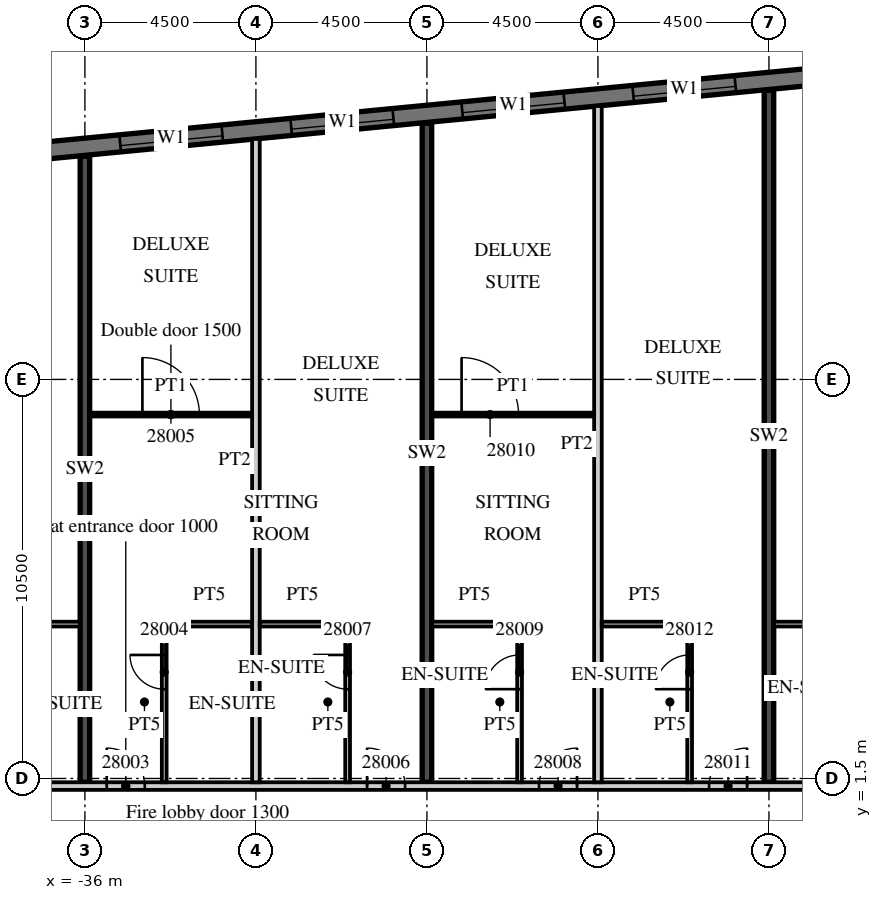
"""IFC4 building model, lengths in metres.
Left out: names, types, materials, properties, quantities, classifications, styles, units other than length and angle.
Written with IfcOpenShell. Run it as: python <this file> out.ifc"""

import sys

from ifc_helpers import new_model, si_unit, direction, frame, frame_2d, origin, place, context, subcontext, project, spatial, rectangle, extrude, element, fill, save


model = new_model("IFC4")
c1 = context("Model", 3, precision=1e-05, world=origin(), true_north=direction((0.0, 1.0)))
c2 = subcontext(c1, "Body", "Model", "MODEL_VIEW")
j1 = project(units=[si_unit("LENGTHUNIT", "METRE"), si_unit("PLANEANGLEUNIT", "RADIAN")], contexts=[c1])
p1 = place(None, origin())
s1 = spatial("IfcSite", under=j1, at=p1, CompositionType="ELEMENT")
p2 = place(p1, origin())
s2 = spatial("IfcBuilding", under=s1, at=p2, CompositionType="ELEMENT")
p3 = place(p2, frame((0.0, 0.0, 127.3)))
s3 = spatial("IfcBuildingStorey", under=s2, at=p3, CompositionType="ELEMENT", Elevation=127.3)
p4 = place(p3, frame((-36.0, 1.4, 0.0), z_axis=(0.0, 0.0, 1.0), x_axis=(0.0, 1.0, 0.0)))
e1 = element("IfcWall", 1, at=p4, inside=s3, PredefinedType="SHEAR", context=c2, shape_type="SweptSolid", body=[
    extrude(rectangle(XDim=16.474, YDim=0.25, at=frame_2d((8.237, 0.0))), origin(), (0.0, 0.0, 1.0), 3.3),
])
p5 = place(p3, frame((-27.0, 1.4, 0.0), z_axis=(0.0, 0.0, 1.0), x_axis=(0.0, 1.0, 0.0)))
e2 = element("IfcWall", 2, at=p5, inside=s3, PredefinedType="SHEAR", context=c2, shape_type="SweptSolid", body=[
    extrude(rectangle(XDim=17.34, YDim=0.25, at=frame_2d((8.67, 0.0))), origin(), (0.0, 0.0, 1.0), 3.3),
])
p6 = place(p3, frame((-18.0, 1.4, 0.0), z_axis=(0.0, 0.0, 1.0), x_axis=(0.0, 1.0, 0.0)))
e3 = element("IfcWall", 3, at=p6, inside=s3, PredefinedType="SHEAR", context=c2, shape_type="SweptSolid", body=[
    extrude(rectangle(XDim=18.207, YDim=0.25, at=frame_2d((9.104, 0.0))), origin(), (0.0, 0.0, 1.0), 3.3),
])
p7 = place(p3, frame((13.521, 22.89, 0.0), z_axis=(0.0, 0.0, 1.0), x_axis=(-0.995396445054, -0.095843190545, 0.0)))
e4 = element("IfcWall", 4, at=p7, inside=s3, PredefinedType="SOLIDWALL", context=c2, shape_type="SweptSolid", body=[
    extrude(rectangle(XDim=51.114, YDim=0.45, at=frame_2d((25.557, 0.0))), origin(), (0.0, 0.0, 1.0), 3.02),
])
p8 = place(p7, frame((0.91, 0.0, 0.45)))
e5 = element("IfcOpeningElement", 5, at=p8, cuts=e4, PredefinedType="OPENING", context=c2, shape_type="SweptSolid", body=[
    extrude(rectangle(XDim=2.7, YDim=2.25, at=frame_2d((1.35, 1.125))), frame((0.0, 0.235, 0.0), z_axis=(0.0, -1.0, 0.0), x_axis=(1.0, 0.0, 0.0)), (0.0, 0.0, 1.0), 0.47),
])
p9 = place(p7, frame((5.431, 0.0, 0.45)))
e6 = element("IfcOpeningElement", 6, at=p9, cuts=e4, PredefinedType="OPENING", context=c2, shape_type="SweptSolid", body=[
    extrude(rectangle(XDim=2.7, YDim=2.25, at=frame_2d((1.35, 1.125))), frame((0.0, 0.235, 0.0), z_axis=(0.0, -1.0, 0.0), x_axis=(1.0, 0.0, 0.0)), (0.0, 0.0, 1.0), 0.47),
])
p10 = place(p7, frame((9.952, 0.0, 0.45)))
e7 = element("IfcOpeningElement", 7, at=p10, cuts=e4, PredefinedType="OPENING", context=c2, shape_type="SweptSolid", body=[
    extrude(rectangle(XDim=2.7, YDim=2.25, at=frame_2d((1.35, 1.125))), frame((0.0, 0.235, 0.0), z_axis=(0.0, -1.0, 0.0), x_axis=(1.0, 0.0, 0.0)), (0.0, 0.0, 1.0), 0.47),
])
p11 = place(p7, frame((14.473, 0.0, 0.45)))
e8 = element("IfcOpeningElement", 8, at=p11, cuts=e4, PredefinedType="OPENING", context=c2, shape_type="SweptSolid", body=[
    extrude(rectangle(XDim=2.7, YDim=2.25, at=frame_2d((1.35, 1.125))), frame((0.0, 0.235, 0.0), z_axis=(0.0, -1.0, 0.0), x_axis=(1.0, 0.0, 0.0)), (0.0, 0.0, 1.0), 0.47),
])
p12 = place(p7, frame((18.994, 0.0, 0.45)))
e9 = element("IfcOpeningElement", 9, at=p12, cuts=e4, PredefinedType="OPENING", context=c2, shape_type="SweptSolid", body=[
    extrude(rectangle(XDim=2.7, YDim=2.25, at=frame_2d((1.35, 1.125))), frame((0.0, 0.235, 0.0), z_axis=(0.0, -1.0, 0.0), x_axis=(1.0, 0.0, 0.0)), (0.0, 0.0, 1.0), 0.47),
])
p13 = place(p7, frame((23.514, 0.0, 0.45)))
e10 = element("IfcOpeningElement", 10, at=p13, cuts=e4, PredefinedType="OPENING", context=c2, shape_type="SweptSolid", body=[
    extrude(rectangle(XDim=2.7, YDim=2.25, at=frame_2d((1.35, 1.125))), frame((0.0, 0.235, 0.0), z_axis=(0.0, -1.0, 0.0), x_axis=(1.0, 0.0, 0.0)), (0.0, 0.0, 1.0), 0.47),
])
p14 = place(p7, frame((28.035, 0.0, 0.45)))
e11 = element("IfcOpeningElement", 11, at=p14, cuts=e4, PredefinedType="OPENING", context=c2, shape_type="SweptSolid", body=[
    extrude(rectangle(XDim=2.7, YDim=2.25, at=frame_2d((1.35, 1.125))), frame((0.0, 0.235, 0.0), z_axis=(0.0, -1.0, 0.0), x_axis=(1.0, 0.0, 0.0)), (0.0, 0.0, 1.0), 0.47),
])
p15 = place(p7, frame((32.556, 0.0, 0.45)))
e12 = element("IfcOpeningElement", 12, at=p15, cuts=e4, PredefinedType="OPENING", context=c2, shape_type="SweptSolid", body=[
    extrude(rectangle(XDim=2.7, YDim=2.25, at=frame_2d((1.35, 1.125))), frame((0.0, 0.235, 0.0), z_axis=(0.0, -1.0, 0.0), x_axis=(1.0, 0.0, 0.0)), (0.0, 0.0, 1.0), 0.47),
])
p16 = place(p7, frame((37.077, 0.0, 0.45)))
e13 = element("IfcOpeningElement", 13, at=p16, cuts=e4, PredefinedType="OPENING", context=c2, shape_type="SweptSolid", body=[
    extrude(rectangle(XDim=2.7, YDim=2.25, at=frame_2d((1.35, 1.125))), frame((0.0, 0.235, 0.0), z_axis=(0.0, -1.0, 0.0), x_axis=(1.0, 0.0, 0.0)), (0.0, 0.0, 1.0), 0.47),
])
p17 = place(p7, frame((41.598, 0.0, 0.45)))
e14 = element("IfcOpeningElement", 14, at=p17, cuts=e4, PredefinedType="OPENING", context=c2, shape_type="SweptSolid", body=[
    extrude(rectangle(XDim=2.7, YDim=2.25, at=frame_2d((1.35, 1.125))), frame((0.0, 0.235, 0.0), z_axis=(0.0, -1.0, 0.0), x_axis=(1.0, 0.0, 0.0)), (0.0, 0.0, 1.0), 0.47),
])
p18 = place(p7, frame((46.118, 0.0, 0.45)))
e15 = element("IfcOpeningElement", 15, at=p18, cuts=e4, PredefinedType="OPENING", context=c2, shape_type="SweptSolid", body=[
    extrude(rectangle(XDim=2.7, YDim=2.25, at=frame_2d((1.35, 1.125))), frame((0.0, 0.235, 0.0), z_axis=(0.0, -1.0, 0.0), x_axis=(1.0, 0.0, 0.0)), (0.0, 0.0, 1.0), 0.47),
])
p19 = place(p3, frame((-39.316, 1.3, 0.0), z_axis=(0.0, 0.0, 1.0), x_axis=(1.0, 0.0, 0.0)))
e16 = element("IfcWall", 16, at=p19, inside=s3, PredefinedType="PARTITIONING", context=c2, shape_type="SweptSolid", body=[
    extrude(rectangle(XDim=52.816, YDim=0.2, at=frame_2d((26.408, 0.0))), origin(), (0.0, 0.0, 1.0), 3.02),
])
p20 = place(p19, frame((0.15, 0.0, 0.0)))
e17 = element("IfcOpeningElement", 17, at=p20, cuts=e16, PredefinedType="OPENING", context=c2, shape_type="SweptSolid", body=[
    extrude(rectangle(XDim=0.9, YDim=2.1, at=frame_2d((0.45, 1.05))), frame((0.0, 0.11, 0.0), z_axis=(0.0, -1.0, 0.0), x_axis=(1.0, 0.0, 0.0)), (0.0, 0.0, 1.0), 0.22),
])
p21 = place(p19, frame((3.891, 0.0, 0.0)))
e18 = element("IfcOpeningElement", 18, at=p21, cuts=e16, PredefinedType="OPENING", context=c2, shape_type="SweptSolid", body=[
    extrude(rectangle(XDim=1.0, YDim=2.1, at=frame_2d((0.5, 1.05))), frame((0.0, 0.11, 0.0), z_axis=(0.0, -1.0, 0.0), x_axis=(1.0, 0.0, 0.0)), (0.0, 0.0, 1.0), 0.22),
])
p22 = place(p19, frame((10.741, 0.0, 0.0)))
e19 = element("IfcOpeningElement", 19, at=p22, cuts=e16, PredefinedType="OPENING", context=c2, shape_type="SweptSolid", body=[
    extrude(rectangle(XDim=1.0, YDim=2.1, at=frame_2d((0.5, 1.05))), frame((0.0, 0.11, 0.0), z_axis=(0.0, -1.0, 0.0), x_axis=(1.0, 0.0, 0.0)), (0.0, 0.0, 1.0), 0.22),
])
p23 = place(p19, frame((15.266, 0.0, 0.0)))
e20 = element("IfcOpeningElement", 20, at=p23, cuts=e16, PredefinedType="OPENING", context=c2, shape_type="SweptSolid", body=[
    extrude(rectangle(XDim=1.0, YDim=2.1, at=frame_2d((0.5, 1.05))), frame((0.0, 0.11, 0.0), z_axis=(0.0, -1.0, 0.0), x_axis=(1.0, 0.0, 0.0)), (0.0, 0.0, 1.0), 0.22),
])
p24 = place(p19, frame((19.741, 0.0, 0.0)))
e21 = element("IfcOpeningElement", 21, at=p24, cuts=e16, PredefinedType="OPENING", context=c2, shape_type="SweptSolid", body=[
    extrude(rectangle(XDim=1.0, YDim=2.1, at=frame_2d((0.5, 1.05))), frame((0.0, 0.11, 0.0), z_axis=(0.0, -1.0, 0.0), x_axis=(1.0, 0.0, 0.0)), (0.0, 0.0, 1.0), 0.22),
])
p25 = place(p19, frame((26.678, 0.0, 0.0)))
e22 = element("IfcOpeningElement", 22, at=p25, cuts=e16, PredefinedType="OPENING", context=c2, shape_type="SweptSolid", body=[
    extrude(rectangle(XDim=1.2, YDim=2.1, at=frame_2d((0.6, 1.05))), frame((0.0, 0.11, 0.0), z_axis=(0.0, -1.0, 0.0), x_axis=(1.0, 0.0, 0.0)), (0.0, 0.0, 1.0), 0.22),
])
p26 = place(p19, frame((35.678, 0.0, 0.0)))
e23 = element("IfcOpeningElement", 23, at=p26, cuts=e16, PredefinedType="OPENING", context=c2, shape_type="SweptSolid", body=[
    extrude(rectangle(XDim=1.2, YDim=2.1, at=frame_2d((0.6, 1.05))), frame((0.0, 0.11, 0.0), z_axis=(0.0, -1.0, 0.0), x_axis=(1.0, 0.0, 0.0)), (0.0, 0.0, 1.0), 0.22),
])
p27 = place(p19, frame((41.754, 0.0, 0.0)))
e24 = element("IfcOpeningElement", 24, at=p27, cuts=e16, PredefinedType="OPENING", context=c2, shape_type="SweptSolid", body=[
    extrude(rectangle(XDim=1.2, YDim=2.1, at=frame_2d((0.6, 1.05))), frame((0.0, 0.11, 0.0), z_axis=(0.0, -1.0, 0.0), x_axis=(1.0, 0.0, 0.0)), (0.0, 0.0, 1.0), 0.22),
])
p28 = place(p19, frame((51.241, 0.0, 0.0)))
e25 = element("IfcOpeningElement", 25, at=p28, cuts=e16, PredefinedType="OPENING", context=c2, shape_type="SweptSolid", body=[
    extrude(rectangle(XDim=1.0, YDim=2.1, at=frame_2d((0.5, 1.05))), frame((0.0, 0.11, 0.0), z_axis=(0.0, -1.0, 0.0), x_axis=(1.0, 0.0, 0.0)), (0.0, 0.0, 1.0), 0.22),
])
p29 = place(p3, frame((-38.457, 5.562, 0.0), z_axis=(0.0, 0.0, 1.0), x_axis=(1.0, 0.0, 0.0)))
e26 = element("IfcWall", 26, at=p29, inside=s3, PredefinedType="PARTITIONING", context=c2, shape_type="SweptSolid", body=[
    extrude(rectangle(XDim=2.332, YDim=0.125, at=frame_2d((1.166, 0.0))), origin(), (0.0, 0.0, 1.0), 3.02),
])
p30 = place(p3, frame((-31.5, 1.4, 0.0), z_axis=(0.0, 0.0, 1.0), x_axis=(0.0, 1.0, 0.0)))
e27 = element("IfcWall", 27, at=p30, inside=s3, PredefinedType="PARTITIONING", context=c2, shape_type="SweptSolid", body=[
    extrude(rectangle(XDim=16.929, YDim=0.2, at=frame_2d((8.465, 0.0))), origin(), (0.0, 0.0, 1.0), 3.02),
])
p31 = place(p3, frame((-33.913, 1.4, 0.0), z_axis=(0.0, 0.0, 1.0), x_axis=(0.0, 1.0, 0.0)))
e28 = element("IfcWall", 28, at=p31, inside=s3, PredefinedType="PARTITIONING", context=c2, shape_type="SweptSolid", body=[
    extrude(rectangle(XDim=4.225, YDim=0.125, at=frame_2d((2.113, 0.0))), origin(), (0.0, 0.0, 1.0), 3.02),
])
p32 = place(p31, frame((2.45, 0.0, 0.0)))
e29 = element("IfcOpeningElement", 29, at=p32, cuts=e28, PredefinedType="OPENING", context=c2, shape_type="SweptSolid", body=[
    extrude(rectangle(XDim=0.9, YDim=2.1, at=frame_2d((0.45, 1.05))), frame((0.0, 0.073, 0.0), z_axis=(0.0, -1.0, 0.0), x_axis=(1.0, 0.0, 0.0)), (0.0, 0.0, 1.0), 0.145),
])
p33 = place(p3, frame((-33.85, 5.562, 0.0), z_axis=(0.0, 0.0, 1.0), x_axis=(1.0, 0.0, 0.0)))
e30 = element("IfcWall", 30, at=p33, inside=s3, PredefinedType="PARTITIONING", context=c2, shape_type="SweptSolid", body=[
    extrude(rectangle(XDim=2.25, YDim=0.125, at=frame_2d((1.125, 0.0))), origin(), (0.0, 0.0, 1.0), 3.02),
])
p34 = place(p3, frame((-35.875, 11.075, 0.0), z_axis=(0.0, 0.0, 1.0), x_axis=(1.0, 0.0, 0.0)))
e31 = element("IfcWall", 31, at=p34, inside=s3, PredefinedType="PARTITIONING", context=c2, shape_type="SweptSolid", body=[
    extrude(rectangle(XDim=4.275, YDim=0.1, at=frame_2d((2.137, 0.0))), origin(), (0.0, 0.0, 1.0), 3.02),
])
p35 = place(p34, frame((1.388, 0.0, 0.0)))
e32 = element("IfcOpeningElement", 32, at=p35, cuts=e31, PredefinedType="OPENING", context=c2, shape_type="SweptSolid", body=[
    extrude(rectangle(XDim=1.5, YDim=2.1, at=frame_2d((0.75, 1.05))), frame((0.0, 0.06, 0.0), z_axis=(0.0, -1.0, 0.0), x_axis=(1.0, 0.0, 0.0)), (0.0, 0.0, 1.0), 0.12),
])
p36 = place(p3, frame((-29.087, 1.4, 0.0), z_axis=(0.0, 0.0, 1.0), x_axis=(0.0, 1.0, 0.0)))
e33 = element("IfcWall", 33, at=p36, inside=s3, PredefinedType="PARTITIONING", context=c2, shape_type="SweptSolid", body=[
    extrude(rectangle(XDim=4.225, YDim=0.125, at=frame_2d((2.113, 0.0))), origin(), (0.0, 0.0, 1.0), 3.02),
])
p37 = place(p36, frame((2.45, 0.0, 0.0)))
e34 = element("IfcOpeningElement", 34, at=p37, cuts=e33, PredefinedType="OPENING", context=c2, shape_type="SweptSolid", body=[
    extrude(rectangle(XDim=0.9, YDim=2.1, at=frame_2d((0.45, 1.05))), frame((0.0, 0.073, 0.0), z_axis=(0.0, -1.0, 0.0), x_axis=(1.0, 0.0, 0.0)), (0.0, 0.0, 1.0), 0.145),
])
p38 = place(p3, frame((-31.4, 5.562, 0.0), z_axis=(0.0, 0.0, 1.0), x_axis=(1.0, 0.0, 0.0)))
e35 = element("IfcWall", 35, at=p38, inside=s3, PredefinedType="PARTITIONING", context=c2, shape_type="SweptSolid", body=[
    extrude(rectangle(XDim=2.25, YDim=0.125, at=frame_2d((1.125, 0.0))), origin(), (0.0, 0.0, 1.0), 3.02),
])
p39 = place(p3, frame((-22.5, 1.4, 0.0), z_axis=(0.0, 0.0, 1.0), x_axis=(0.0, 1.0, 0.0)))
e36 = element("IfcWall", 36, at=p39, inside=s3, PredefinedType="PARTITIONING", context=c2, shape_type="SweptSolid", body=[
    extrude(rectangle(XDim=17.796, YDim=0.2, at=frame_2d((8.898, 0.0))), origin(), (0.0, 0.0, 1.0), 3.02),
])
p40 = place(p3, frame((-24.562, 1.4, 0.0), z_axis=(0.0, 0.0, 1.0), x_axis=(0.0, 1.0, 0.0)))
e37 = element("IfcWall", 37, at=p40, inside=s3, PredefinedType="PARTITIONING", context=c2, shape_type="SweptSolid", body=[
    extrude(rectangle(XDim=4.225, YDim=0.125, at=frame_2d((2.113, 0.0))), origin(), (0.0, 0.0, 1.0), 3.02),
])
p41 = place(p40, frame((2.45, 0.0, 0.0)))
e38 = element("IfcOpeningElement", 38, at=p41, cuts=e37, PredefinedType="OPENING", context=c2, shape_type="SweptSolid", body=[
    extrude(rectangle(XDim=0.9, YDim=2.1, at=frame_2d((0.45, 1.05))), frame((0.0, 0.073, 0.0), z_axis=(0.0, -1.0, 0.0), x_axis=(1.0, 0.0, 0.0)), (0.0, 0.0, 1.0), 0.145),
])
p42 = place(p3, frame((-26.875, 5.562, 0.0), z_axis=(0.0, 0.0, 1.0), x_axis=(1.0, 0.0, 0.0)))
e39 = element("IfcWall", 39, at=p42, inside=s3, PredefinedType="PARTITIONING", context=c2, shape_type="SweptSolid", body=[
    extrude(rectangle(XDim=2.25, YDim=0.125, at=frame_2d((1.125, 0.0))), origin(), (0.0, 0.0, 1.0), 3.02),
])
p43 = place(p3, frame((-26.875, 11.075, 0.0), z_axis=(0.0, 0.0, 1.0), x_axis=(1.0, 0.0, 0.0)))
e40 = element("IfcWall", 40, at=p43, inside=s3, PredefinedType="PARTITIONING", context=c2, shape_type="SweptSolid", body=[
    extrude(rectangle(XDim=4.275, YDim=0.1, at=frame_2d((2.137, 0.0))), origin(), (0.0, 0.0, 1.0), 3.02),
])
p44 = place(p43, frame((0.787, 0.0, 0.0)))
e41 = element("IfcOpeningElement", 41, at=p44, cuts=e40, PredefinedType="OPENING", context=c2, shape_type="SweptSolid", body=[
    extrude(rectangle(XDim=1.5, YDim=2.1, at=frame_2d((0.75, 1.05))), frame((0.0, 0.06, 0.0), z_axis=(0.0, -1.0, 0.0), x_axis=(1.0, 0.0, 0.0)), (0.0, 0.0, 1.0), 0.12),
])
p45 = place(p3, frame((-20.087, 1.4, 0.0), z_axis=(0.0, 0.0, 1.0), x_axis=(0.0, 1.0, 0.0)))
e42 = element("IfcWall", 42, at=p45, inside=s3, PredefinedType="PARTITIONING", context=c2, shape_type="SweptSolid", body=[
    extrude(rectangle(XDim=4.225, YDim=0.125, at=frame_2d((2.113, 0.0))), origin(), (0.0, 0.0, 1.0), 3.02),
])
p46 = place(p45, frame((2.45, 0.0, 0.0)))
e43 = element("IfcOpeningElement", 43, at=p46, cuts=e42, PredefinedType="OPENING", context=c2, shape_type="SweptSolid", body=[
    extrude(rectangle(XDim=0.9, YDim=2.1, at=frame_2d((0.45, 1.05))), frame((0.0, 0.073, 0.0), z_axis=(0.0, -1.0, 0.0), x_axis=(1.0, 0.0, 0.0)), (0.0, 0.0, 1.0), 0.145),
])
p47 = place(p3, frame((-22.4, 5.562, 0.0), z_axis=(0.0, 0.0, 1.0), x_axis=(1.0, 0.0, 0.0)))
e44 = element("IfcWall", 44, at=p47, inside=s3, PredefinedType="PARTITIONING", context=c2, shape_type="SweptSolid", body=[
    extrude(rectangle(XDim=2.25, YDim=0.125, at=frame_2d((1.125, 0.0))), origin(), (0.0, 0.0, 1.0), 3.02),
])
p48 = place(p3, frame((-17.875, 5.562, 0.0), z_axis=(0.0, 0.0, 1.0), x_axis=(1.0, 0.0, 0.0)))
e45 = element("IfcWall", 45, at=p48, inside=s3, PredefinedType="PARTITIONING", context=c2, shape_type="SweptSolid", body=[
    extrude(rectangle(XDim=2.8, YDim=0.125, at=frame_2d((1.4, 0.0))), origin(), (0.0, 0.0, 1.0), 3.02),
])
p49 = place(p15, origin())
e46 = element("IfcWindow", 46, at=p49, inside=s3, PartitioningType="SINGLE_PANEL", PredefinedType="WINDOW", context=c2, shape_type="SweptSolid", body=[
    extrude(rectangle(XDim=2.7, YDim=2.25, at=frame_2d((1.35, 1.125))), frame((0.0, 0.09, 0.0), z_axis=(0.0, -1.0, 0.0), x_axis=(1.0, 0.0, 0.0)), (0.0, 0.0, 1.0), 0.06),
])
fill(e12, e46)
p50 = place(p16, origin())
e47 = element("IfcWindow", 47, at=p50, inside=s3, PartitioningType="SINGLE_PANEL", PredefinedType="WINDOW", context=c2, shape_type="SweptSolid", body=[
    extrude(rectangle(XDim=2.7, YDim=2.25, at=frame_2d((1.35, 1.125))), frame((0.0, 0.09, 0.0), z_axis=(0.0, -1.0, 0.0), x_axis=(1.0, 0.0, 0.0)), (0.0, 0.0, 1.0), 0.06),
])
fill(e13, e47)
p51 = place(p17, origin())
e48 = element("IfcWindow", 48, at=p51, inside=s3, PartitioningType="SINGLE_PANEL", PredefinedType="WINDOW", context=c2, shape_type="SweptSolid", body=[
    extrude(rectangle(XDim=2.7, YDim=2.25, at=frame_2d((1.35, 1.125))), frame((0.0, 0.09, 0.0), z_axis=(0.0, -1.0, 0.0), x_axis=(1.0, 0.0, 0.0)), (0.0, 0.0, 1.0), 0.06),
])
fill(e14, e48)
p52 = place(p18, origin())
e49 = element("IfcWindow", 49, at=p52, inside=s3, PartitioningType="SINGLE_PANEL", PredefinedType="WINDOW", context=c2, shape_type="SweptSolid", body=[
    extrude(rectangle(XDim=2.7, YDim=2.25, at=frame_2d((1.35, 1.125))), frame((0.0, 0.09, 0.0), z_axis=(0.0, -1.0, 0.0), x_axis=(1.0, 0.0, 0.0)), (0.0, 0.0, 1.0), 0.06),
])
fill(e15, e49)
p53 = place(p21, origin())
e50 = element("IfcDoor", 50, at=p53, inside=s3, OperationType="SINGLE_SWING_LEFT", PredefinedType="DOOR", context=c2, shape_type="SweptSolid", body=[
    extrude(rectangle(XDim=1.0, YDim=2.1, at=frame_2d((0.5, 1.05))), frame((0.0, 0.025, 0.0), z_axis=(0.0, -1.0, 0.0), x_axis=(1.0, 0.0, 0.0)), (0.0, 0.0, 1.0), 0.05),
])
fill(e18, e50)
p54 = place(p32, origin())
e51 = element("IfcDoor", 51, at=p54, inside=s3, OperationType="SINGLE_SWING_RIGHT", PredefinedType="DOOR", context=c2, shape_type="SweptSolid", body=[
    extrude(rectangle(XDim=0.9, YDim=2.1, at=frame_2d((0.45, 1.05))), frame((0.0, 0.025, 0.0), z_axis=(0.0, -1.0, 0.0), x_axis=(1.0, 0.0, 0.0)), (0.0, 0.0, 1.0), 0.05),
])
fill(e29, e51)
p55 = place(p35, origin())
e52 = element("IfcDoor", 52, at=p55, inside=s3, OperationType="SINGLE_SWING_LEFT", PredefinedType="DOOR", context=c2, shape_type="SweptSolid", body=[
    extrude(rectangle(XDim=1.5, YDim=2.1, at=frame_2d((0.75, 1.05))), frame((0.0, 0.025, 0.0), z_axis=(0.0, -1.0, 0.0), x_axis=(1.0, 0.0, 0.0)), (0.0, 0.0, 1.0), 0.05),
])
fill(e32, e52)
p56 = place(p22, origin())
e53 = element("IfcDoor", 53, at=p56, inside=s3, OperationType="SINGLE_SWING_LEFT", PredefinedType="DOOR", context=c2, shape_type="SweptSolid", body=[
    extrude(rectangle(XDim=1.0, YDim=2.1, at=frame_2d((0.5, 1.05))), frame((0.0, 0.025, 0.0), z_axis=(0.0, -1.0, 0.0), x_axis=(1.0, 0.0, 0.0)), (0.0, 0.0, 1.0), 0.05),
])
fill(e19, e53)
p57 = place(p37, origin())
e54 = element("IfcDoor", 54, at=p57, inside=s3, OperationType="SINGLE_SWING_RIGHT", PredefinedType="DOOR", context=c2, shape_type="SweptSolid", body=[
    extrude(rectangle(XDim=0.9, YDim=2.1, at=frame_2d((0.45, 1.05))), frame((0.0, 0.025, 0.0), z_axis=(0.0, -1.0, 0.0), x_axis=(1.0, 0.0, 0.0)), (0.0, 0.0, 1.0), 0.05),
])
fill(e34, e54)
p58 = place(p23, origin())
e55 = element("IfcDoor", 55, at=p58, inside=s3, OperationType="SINGLE_SWING_RIGHT", PredefinedType="DOOR", context=c2, shape_type="SweptSolid", body=[
    extrude(rectangle(XDim=1.0, YDim=2.1, at=frame_2d((0.5, 1.05))), frame((0.0, 0.025, 0.0), z_axis=(0.0, -1.0, 0.0), x_axis=(1.0, 0.0, 0.0)), (0.0, 0.0, 1.0), 0.05),
])
fill(e20, e55)
p59 = place(p41, origin())
e56 = element("IfcDoor", 56, at=p59, inside=s3, OperationType="SINGLE_SWING_LEFT", PredefinedType="DOOR", context=c2, shape_type="SweptSolid", body=[
    extrude(rectangle(XDim=0.9, YDim=2.1, at=frame_2d((0.45, 1.05))), frame((0.0, 0.025, 0.0), z_axis=(0.0, -1.0, 0.0), x_axis=(1.0, 0.0, 0.0)), (0.0, 0.0, 1.0), 0.05),
])
fill(e38, e56)
p60 = place(p44, origin())
e57 = element("IfcDoor", 57, at=p60, inside=s3, OperationType="SINGLE_SWING_LEFT", PredefinedType="DOOR", context=c2, shape_type="SweptSolid", body=[
    extrude(rectangle(XDim=1.5, YDim=2.1, at=frame_2d((0.75, 1.05))), frame((0.0, 0.025, 0.0), z_axis=(0.0, -1.0, 0.0), x_axis=(1.0, 0.0, 0.0)), (0.0, 0.0, 1.0), 0.05),
])
fill(e41, e57)
p61 = place(p24, origin())
e58 = element("IfcDoor", 58, at=p61, inside=s3, OperationType="SINGLE_SWING_RIGHT", PredefinedType="DOOR", context=c2, shape_type="SweptSolid", body=[
    extrude(rectangle(XDim=1.0, YDim=2.1, at=frame_2d((0.5, 1.05))), frame((0.0, 0.025, 0.0), z_axis=(0.0, -1.0, 0.0), x_axis=(1.0, 0.0, 0.0)), (0.0, 0.0, 1.0), 0.05),
])
fill(e21, e58)
p62 = place(p46, origin())
e59 = element("IfcDoor", 59, at=p62, inside=s3, OperationType="SINGLE_SWING_LEFT", PredefinedType="DOOR", context=c2, shape_type="SweptSolid", body=[
    extrude(rectangle(XDim=0.9, YDim=2.1, at=frame_2d((0.45, 1.05))), frame((0.0, 0.025, 0.0), z_axis=(0.0, -1.0, 0.0), x_axis=(1.0, 0.0, 0.0)), (0.0, 0.0, 1.0), 0.05),
])
fill(e43, e59)
save(model, sys.argv[1])
